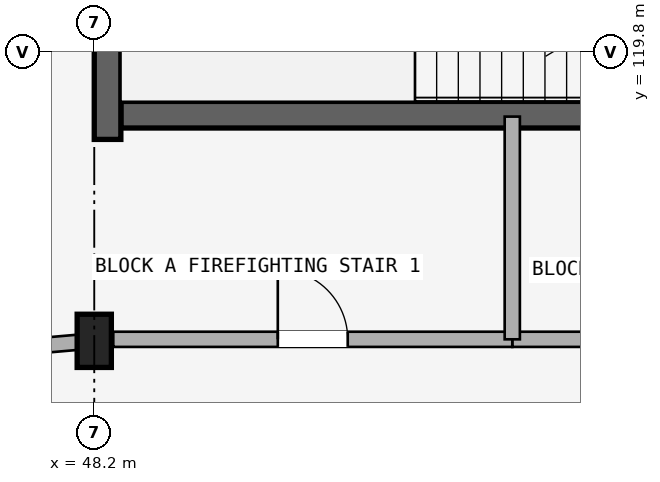
"""IFC4 building model, lengths in metres.
Left out: names, types, materials, properties, quantities, classifications, styles, units other than length and angle.
Written with IfcOpenShell. Run it as: python <this file> out.ifc"""

import sys

from ifc_helpers import new_model, si_unit, direction, frame, frame_2d, origin, origin_2d, place, context, subcontext, project, spatial, rectangle, extrude, element, fill, save


model = new_model("IFC4")
c1 = context("Model", 3, precision=1e-05, world=origin(), true_north=direction((0.0, 1.0)))
c2 = subcontext(c1, "Body", "Model", "MODEL_VIEW")
j1 = project(units=[si_unit("LENGTHUNIT", "METRE"), si_unit("PLANEANGLEUNIT", "RADIAN")], contexts=[c1])
p1 = place(None, origin())
s1 = spatial("IfcSite", under=j1, at=p1, CompositionType="ELEMENT")
p2 = place(p1, origin())
s2 = spatial("IfcBuilding", under=s1, at=p2, CompositionType="ELEMENT")
p3 = place(p2, frame((0.0, 0.0, 24.45)))
s3 = spatial("IfcBuildingStorey", under=s2, at=p3, CompositionType="ELEMENT", Elevation=24.45)
p4 = place(p3, frame((48.55, 118.975, 0.0), z_axis=(0.0, 0.0, 1.0), x_axis=(1.0, 0.0, 0.0)))
e1 = element("IfcWall", 1, at=p4, inside=s3, PredefinedType="SHEAR", context=c2, shape_type="SweptSolid", body=[
    extrude(rectangle(XDim=8.075, YDim=0.35, at=frame_2d((4.038, 0.0))), origin(), (0.0, 0.0, 1.0), 2.93),
])
p5 = place(p4, frame((6.38, 0.0, 0.0)))
e2 = element("IfcOpeningElement", 2, at=p5, cuts=e1, PredefinedType="OPENING", context=c2, shape_type="SweptSolid", body=[
    extrude(rectangle(XDim=1.24, YDim=2.15, at=frame_2d((0.62, 1.075))), frame((0.0, 0.185, 0.0), z_axis=(0.0, -1.0, 0.0), x_axis=(1.0, 0.0, 0.0)), (0.0, 0.0, 1.0), 0.37),
])
p6 = place(p3, frame((48.375, 118.65, 0.0), z_axis=(0.0, 0.0, 1.0), x_axis=(0.0, 1.0, 0.0)))
e3 = element("IfcWall", 3, at=p6, inside=s3, PredefinedType="SHEAR", context=c2, shape_type="SweptSolid", body=[
    extrude(rectangle(XDim=3.6, YDim=0.35, at=frame_2d((1.8, 0.0))), origin(), (0.0, 0.0, 1.0), 2.93),
])
p7 = place(p3, frame((48.2, 116.0, 0.0), z_axis=(0.0, 0.0, 1.0), x_axis=(1.0, 0.0, 0.0)))
e4 = element("IfcColumn", 4, at=p7, inside=s3, PredefinedType="COLUMN", context=c2, shape_type="SweptSolid", body=[
    extrude(rectangle(XDim=0.45, YDim=0.7, at=origin_2d()), origin(), (0.0, 0.0, 1.0), 2.93),
])
p8 = place(p3, frame((53.7, 116.02, 0.0), z_axis=(0.0, 0.0, 1.0), x_axis=(1.0, 0.0, 0.0)))
e5 = element("IfcWall", 5, at=p8, inside=s3, PredefinedType="STANDARD", context=c2, shape_type="SweptSolid", body=[
    extrude(rectangle(XDim=5.65, YDim=0.2, at=frame_2d((2.825, 0.0))), origin(), (0.0, 0.0, 1.0), 2.372),
])
p9 = place(p8, frame((1.923, 0.0, 0.0)))
e6 = element("IfcOpeningElement", 6, at=p9, cuts=e5, PredefinedType="OPENING", context=c2, shape_type="SweptSolid", body=[
    extrude(rectangle(XDim=1.24, YDim=2.15, at=frame_2d((0.62, 1.075))), frame((0.0, 0.11, 0.0), z_axis=(0.0, -1.0, 0.0), x_axis=(1.0, 0.0, 0.0)), (0.0, 0.0, 1.0), 0.22),
])
p10 = place(p3, frame((48.45, 116.02, 0.0), z_axis=(0.0, 0.0, 1.0), x_axis=(1.0, 0.0, 0.0)))
e7 = element("IfcWall", 7, at=p10, inside=s3, PredefinedType="STANDARD", context=c2, shape_type="SweptSolid", body=[
    extrude(rectangle(XDim=5.25, YDim=0.2, at=frame_2d((2.625, 0.0))), origin(), (0.0, 0.0, 1.0), 2.372),
])
p11 = place(p10, frame((2.165, 0.0, 0.0)))
e8 = element("IfcOpeningElement", 8, at=p11, cuts=e7, PredefinedType="OPENING", context=c2, shape_type="SweptSolid", body=[
    extrude(rectangle(XDim=0.92, YDim=2.1, at=frame_2d((0.46, 1.05))), frame((0.0, 0.11, 0.0), z_axis=(0.0, -1.0, 0.0), x_axis=(1.0, 0.0, 0.0)), (0.0, 0.0, 1.0), 0.22),
])
p12 = place(p3, frame((53.7, 116.02, 0.0), z_axis=(0.0, 0.0, 1.0), x_axis=(0.0, 1.0, 0.0)))
e9 = element("IfcWall", 9, at=p12, inside=s3, PredefinedType="STANDARD", context=c2, shape_type="SweptSolid", body=[
    extrude(rectangle(XDim=2.93, YDim=0.2, at=frame_2d((1.465, 0.0))), origin(), (0.0, 0.0, 1.0), 2.372),
])
p13 = place(p3, frame((48.2, 116.0, 0.0), z_axis=(0.0, 0.0, 1.0), x_axis=(-0.996193663584, -0.087167566415, 0.0)))
e10 = element("IfcWall", 10, at=p13, inside=s3, PredefinedType="STANDARD", context=c2, shape_type="SweptSolid", body=[
    extrude(rectangle(XDim=4.916, YDim=0.2, at=frame_2d((2.458, 0.0))), origin(), (0.0, 0.0, 1.0), 2.372),
])
p14 = place(p13, frame((1.938, 0.0, 0.0)))
e11 = element("IfcOpeningElement", 11, at=p14, cuts=e10, PredefinedType="OPENING", context=c2, shape_type="SweptSolid", body=[
    extrude(rectangle(XDim=1.04, YDim=2.15, at=frame_2d((0.52, 1.075))), frame((0.0, 0.11, 0.0), z_axis=(0.0, -1.0, 0.0), x_axis=(1.0, 0.0, 0.0)), (0.0, 0.0, 1.0), 0.22),
])
p15 = place(p11, frame((0.92, 0.0, 0.0), z_axis=(0.0, 0.0, 1.0), x_axis=(-1.0, 0.0, 0.0)))
e12 = element("IfcDoor", 12, at=p15, inside=s3, OperationType="SINGLE_SWING_RIGHT", PredefinedType="DOOR", context=c2, shape_type="SweptSolid", body=[
    extrude(rectangle(XDim=0.92, YDim=2.1, at=frame_2d((0.46, 1.05))), frame((0.0, 0.025, 0.0), z_axis=(0.0, -1.0, 0.0), x_axis=(1.0, 0.0, 0.0)), (0.0, 0.0, 1.0), 0.05),
])
fill(e8, e12)
save(model, sys.argv[1])
